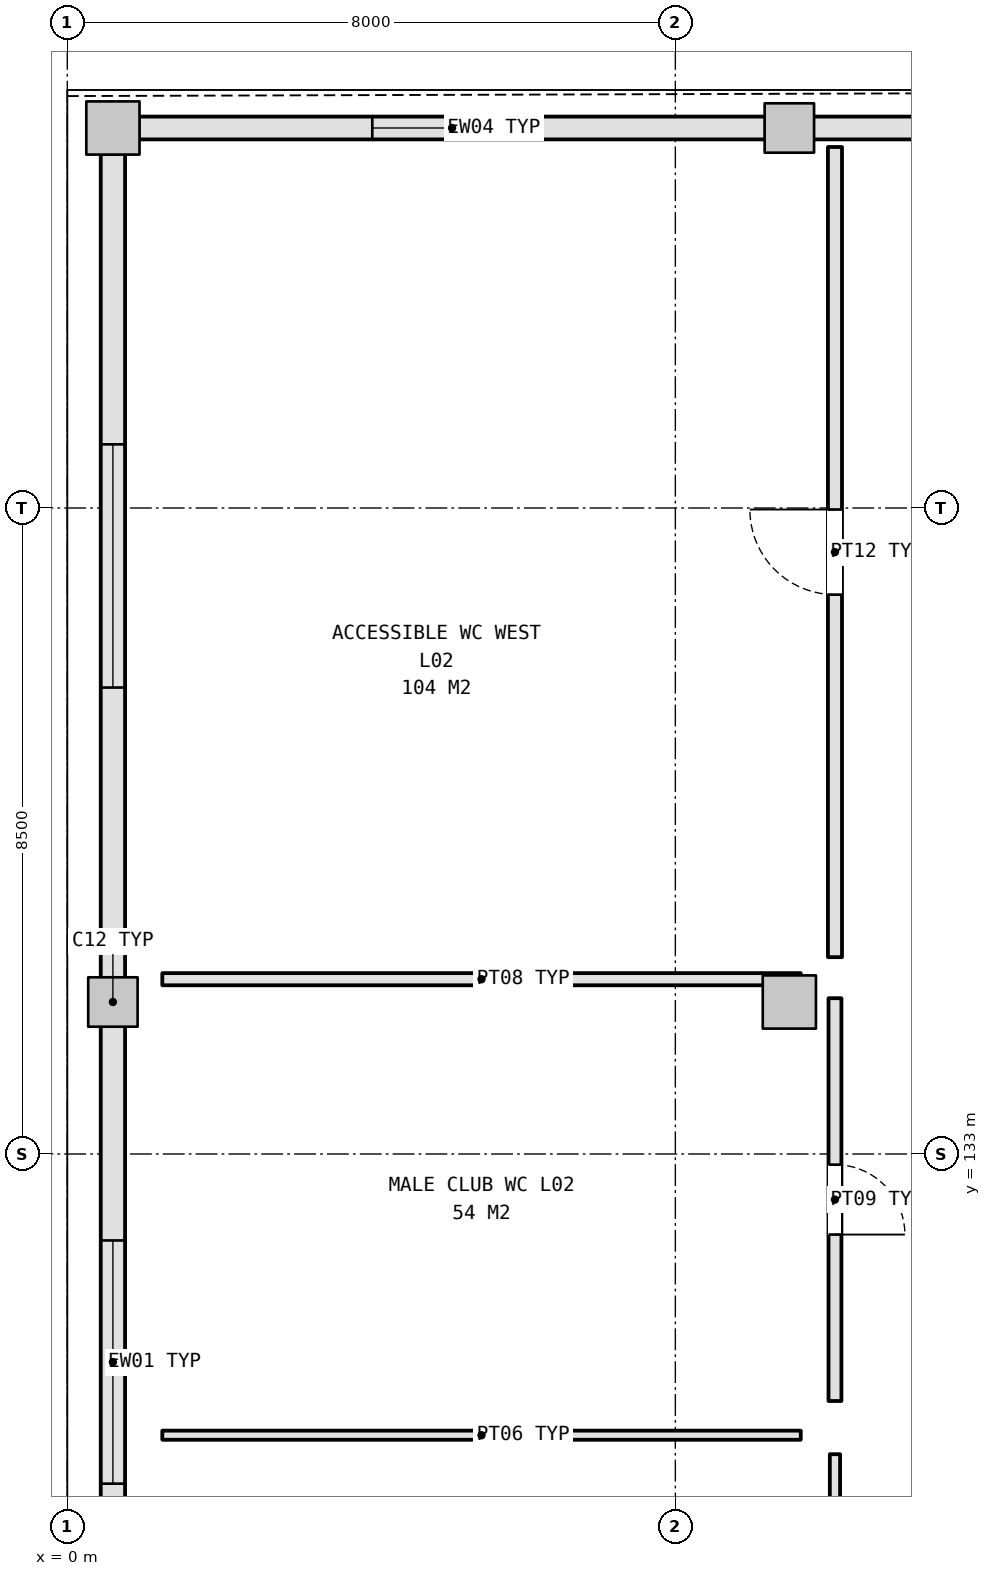
"""IFC4 building model, lengths in metres.
Left out: names, types, materials, properties, quantities, classifications, styles, units other than length and angle.
Written with IfcOpenShell. Run it as: python <this file> out.ifc"""

import sys

from ifc_helpers import new_model, si_unit, direction, frame, frame_2d, origin, origin_2d, place, context, subcontext, project, spatial, rectangle, extrude, element, fill, save


model = new_model("IFC4")
c1 = context("Model", 3, precision=1e-05, world=origin(), true_north=direction((0.0, 1.0)))
c2 = subcontext(c1, "Body", "Model", "MODEL_VIEW")
j1 = project(units=[si_unit("LENGTHUNIT", "METRE"), si_unit("PLANEANGLEUNIT", "RADIAN")], contexts=[c1])
p1 = place(None, origin())
s1 = spatial("IfcSite", under=j1, at=p1, CompositionType="ELEMENT")
p2 = place(p1, origin())
s2 = spatial("IfcBuilding", under=s1, at=p2, CompositionType="ELEMENT")
p3 = place(p2, frame((0.0, 0.0, 10.8)))
s3 = spatial("IfcBuildingStorey", under=s2, at=p3, CompositionType="ELEMENT", Elevation=10.8)
p4 = place(p3, frame((0.6, 135.0, 0.0), z_axis=(0.0, 0.0, 1.0), x_axis=(1.0, 0.0, 0.0)))
e1 = element("IfcColumn", 1, at=p4, inside=s3, PredefinedType="COLUMN", context=c2, shape_type="SweptSolid", body=[
    extrude(rectangle(XDim=0.65, YDim=0.65, at=origin_2d()), origin(), (0.0, 0.0, 1.0), 5.4),
])
for number, where, z_axis, x_axis in (
    (2, (0.6, 146.5, 0.0), (0.0, 0.0, 1.0), (1.0, 0.0, 0.0)),
    (3, (9.5, 135.0, 0.0), (0.0, 0.0, 1.0), (1.0, 0.0, 0.0)),
):
    element("IfcColumn", number, at=place(p3, frame(where, z_axis=z_axis, x_axis=x_axis)), inside=s3, PredefinedType="COLUMN", context=c2, shape_type="SweptSolid", body=[
        extrude(rectangle(XDim=0.7, YDim=0.7, at=origin_2d()), origin(), (0.0, 0.0, 1.0), 5.4),
    ])
p5 = place(p3, frame((9.5, 146.5, 0.0), z_axis=(0.0, 0.0, 1.0), x_axis=(1.0, 0.0, 0.0)))
e4 = element("IfcColumn", 4, at=p5, inside=s3, PredefinedType="COLUMN", context=c2, shape_type="SweptSolid", body=[
    extrude(rectangle(XDim=0.65, YDim=0.65, at=origin_2d()), origin(), (0.0, 0.0, 1.0), 5.4),
])
p6 = place(p3, frame((0.6, 125.838, 0.0), z_axis=(0.0, 0.0, 1.0), x_axis=(0.0, 1.0, 0.0)))
e5 = element("IfcWall", 5, at=p6, inside=s3, PredefinedType="SOLIDWALL", context=c2, shape_type="SweptSolid", body=[
    extrude(rectangle(XDim=8.849, YDim=0.32, at=frame_2d((4.425, 0.0))), origin(), (0.0, 0.0, 1.0), 4.485),
])
p7 = place(p6, frame((2.824, 0.0, 1.05)))
e6 = element("IfcOpeningElement", 6, at=p7, cuts=e5, PredefinedType="OPENING", context=c2, shape_type="SweptSolid", body=[
    extrude(rectangle(XDim=3.2, YDim=2.2, at=frame_2d((1.6, 1.1))), frame((0.0, 0.17, 0.0), z_axis=(0.0, -1.0, 0.0), x_axis=(1.0, 0.0, 0.0)), (0.0, 0.0, 1.0), 0.34),
])
p8 = place(p3, frame((0.6, 135.313, 0.0), z_axis=(0.0, 0.0, 1.0), x_axis=(0.0, 1.0, 0.0)))
e7 = element("IfcWall", 7, at=p8, inside=s3, PredefinedType="SOLIDWALL", context=c2, shape_type="SweptSolid", body=[
    extrude(rectangle(XDim=10.849, YDim=0.32, at=frame_2d((5.425, 0.0))), origin(), (0.0, 0.0, 1.0), 4.485),
])
p9 = place(p8, frame((3.824, 0.0, 1.05)))
e8 = element("IfcOpeningElement", 8, at=p9, cuts=e7, PredefinedType="OPENING", context=c2, shape_type="SweptSolid", body=[
    extrude(rectangle(XDim=3.2, YDim=2.2, at=frame_2d((1.6, 1.1))), frame((0.0, 0.17, 0.0), z_axis=(0.0, -1.0, 0.0), x_axis=(1.0, 0.0, 0.0)), (0.0, 0.0, 1.0), 0.34),
])
p10 = place(p3, frame((0.938, 146.5, 0.0), z_axis=(0.0, 0.0, 1.0), x_axis=(1.0, 0.0, 0.0)))
e9 = element("IfcWall", 9, at=p10, inside=s3, PredefinedType="SOLIDWALL", context=c2, shape_type="SweptSolid", body=[
    extrude(rectangle(XDim=8.249, YDim=0.3, at=frame_2d((4.125, 0.0))), origin(), (0.0, 0.0, 1.0), 4.485),
])
p11 = place(p10, frame((3.074, 0.0, 1.05)))
e10 = element("IfcOpeningElement", 10, at=p11, cuts=e9, PredefinedType="OPENING", context=c2, shape_type="SweptSolid", body=[
    extrude(rectangle(XDim=2.1, YDim=2.1, at=frame_2d((1.05, 1.05))), frame((0.0, 0.16, 0.0), z_axis=(0.0, -1.0, 0.0), x_axis=(1.0, 0.0, 0.0)), (0.0, 0.0, 1.0), 0.32),
])
p12 = place(p3, frame((9.813, 146.5, 0.0), z_axis=(0.0, 0.0, 1.0), x_axis=(1.0, 0.0, 0.0)))
e11 = element("IfcWall", 11, at=p12, inside=s3, PredefinedType="SOLIDWALL", context=c2, shape_type="SweptSolid", body=[
    extrude(rectangle(XDim=8.249, YDim=0.3, at=frame_2d((4.125, 0.0))), origin(), (0.0, 0.0, 1.0), 4.485),
])
p13 = place(p12, frame((3.074, 0.0, 1.05)))
e12 = element("IfcOpeningElement", 12, at=p13, cuts=e11, PredefinedType="OPENING", context=c2, shape_type="SweptSolid", body=[
    extrude(rectangle(XDim=2.1, YDim=2.1, at=frame_2d((1.05, 1.05))), frame((0.0, 0.16, 0.0), z_axis=(0.0, -1.0, 0.0), x_axis=(1.0, 0.0, 0.0)), (0.0, 0.0, 1.0), 0.32),
])
p14 = place(p3, frame((10.1, 129.05, 0.0), z_axis=(0.0, 0.0, 1.0), x_axis=(0.0, -1.0, 0.0)))
e13 = element("IfcWall", 13, at=p14, inside=s3, PredefinedType="PARTITIONING", context=c2, shape_type="SweptSolid", body=[
    extrude(rectangle(XDim=9.3, YDim=0.135, at=frame_2d((4.65, 0.0))), origin(), (0.0, 0.0, 1.0), 4.678),
])
p15 = place(p14, frame((4.2, 0.0, 0.0)))
e14 = element("IfcOpeningElement", 14, at=p15, cuts=e13, PredefinedType="OPENING", context=c2, shape_type="SweptSolid", body=[
    extrude(rectangle(XDim=1.7, YDim=2.25, at=frame_2d((0.85, 1.125))), frame((0.0, 0.077, 0.0), z_axis=(0.0, -1.0, 0.0), x_axis=(1.0, 0.0, 0.0)), (0.0, 0.0, 1.0), 0.155),
])
p16 = place(p3, frame((1.25, 129.3, 0.0), z_axis=(0.0, 0.0, 1.0), x_axis=(1.0, 0.0, 0.0)))
e15 = element("IfcWall", 15, at=p16, inside=s3, PredefinedType="PARTITIONING", context=c2, shape_type="SweptSolid", body=[
    extrude(rectangle(XDim=8.4, YDim=0.12, at=frame_2d((4.2, 0.0))), origin(), (0.0, 0.0, 1.0), 4.485),
])
p17 = place(p3, frame((10.1, 135.05, 0.0), z_axis=(0.0, 0.0, 1.0), x_axis=(0.0, -1.0, 0.0)))
e16 = element("IfcWall", 16, at=p17, inside=s3, PredefinedType="PARTITIONING", context=c2, shape_type="SweptSolid", body=[
    extrude(rectangle(XDim=5.3, YDim=0.17, at=frame_2d((2.65, 0.0))), origin(), (0.0, 0.0, 1.0), 4.678),
])
p18 = place(p17, frame((2.19, 0.0, 0.0)))
e17 = element("IfcOpeningElement", 17, at=p18, cuts=e16, PredefinedType="OPENING", context=c2, shape_type="SweptSolid", body=[
    extrude(rectangle(XDim=0.92, YDim=2.1, at=frame_2d((0.46, 1.05))), frame((0.0, 0.095, 0.0), z_axis=(0.0, -1.0, 0.0), x_axis=(1.0, 0.0, 0.0)), (0.0, 0.0, 1.0), 0.19),
])
p19 = place(p3, frame((1.25, 135.3, 0.0), z_axis=(0.0, 0.0, 1.0), x_axis=(1.0, 0.0, 0.0)))
e18 = element("IfcWall", 18, at=p19, inside=s3, PredefinedType="PARTITIONING", context=c2, shape_type="SweptSolid", body=[
    extrude(rectangle(XDim=8.4, YDim=0.16, at=frame_2d((4.2, 0.0))), origin(), (0.0, 0.0, 1.0), 4.485),
])
p20 = place(p3, frame((10.1, 146.25, 0.0), z_axis=(0.0, 0.0, 1.0), x_axis=(0.0, -1.0, 0.0)))
e19 = element("IfcWall", 19, at=p20, inside=s3, PredefinedType="PARTITIONING", context=c2, shape_type="SweptSolid", body=[
    extrude(rectangle(XDim=10.66, YDim=0.185, at=frame_2d((5.33, 0.0))), origin(), (0.0, 0.0, 1.0), 4.678),
])
p21 = place(p20, frame((4.77, 0.0, 0.0)))
e20 = element("IfcOpeningElement", 20, at=p21, cuts=e19, PredefinedType="OPENING", context=c2, shape_type="SweptSolid", body=[
    extrude(rectangle(XDim=1.12, YDim=2.2, at=frame_2d((0.56, 1.1))), frame((0.0, 0.103, 0.0), z_axis=(0.0, -1.0, 0.0), x_axis=(1.0, 0.0, 0.0)), (0.0, 0.0, 1.0), 0.205),
])
p22 = place(p7, origin())
e21 = element("IfcWindow", 21, at=p22, inside=s3, PartitioningType="SINGLE_PANEL", PredefinedType="WINDOW", context=c2, shape_type="SweptSolid", body=[
    extrude(rectangle(XDim=3.2, YDim=2.2, at=frame_2d((1.6, 1.1))), frame((0.0, 0.03, 0.0), z_axis=(0.0, -1.0, 0.0), x_axis=(1.0, 0.0, 0.0)), (0.0, 0.0, 1.0), 0.06),
])
fill(e6, e21)
p23 = place(p9, origin())
e22 = element("IfcWindow", 22, at=p23, inside=s3, PartitioningType="SINGLE_PANEL", PredefinedType="WINDOW", context=c2, shape_type="SweptSolid", body=[
    extrude(rectangle(XDim=3.2, YDim=2.2, at=frame_2d((1.6, 1.1))), frame((0.0, 0.03, 0.0), z_axis=(0.0, -1.0, 0.0), x_axis=(1.0, 0.0, 0.0)), (0.0, 0.0, 1.0), 0.06),
])
fill(e8, e22)
p24 = place(p11, origin())
e23 = element("IfcWindow", 23, at=p24, inside=s3, PartitioningType="SINGLE_PANEL", PredefinedType="WINDOW", context=c2, shape_type="SweptSolid", body=[
    extrude(rectangle(XDim=2.1, YDim=2.1, at=frame_2d((1.05, 1.05))), frame((0.0, 0.03, 0.0), z_axis=(0.0, -1.0, 0.0), x_axis=(1.0, 0.0, 0.0)), (0.0, 0.0, 1.0), 0.06),
])
fill(e10, e23)
p25 = place(p18, origin())
e24 = element("IfcDoor", 24, at=p25, inside=s3, OperationType="SINGLE_SWING_RIGHT", PredefinedType="DOOR", context=c2, shape_type="SweptSolid", body=[
    extrude(rectangle(XDim=0.92, YDim=2.1, at=frame_2d((0.46, 1.05))), frame((0.0, 0.025, 0.0), z_axis=(0.0, -1.0, 0.0), x_axis=(1.0, 0.0, 0.0)), (0.0, 0.0, 1.0), 0.05),
])
fill(e17, e24)
p26 = place(p21, frame((1.12, 0.0, 0.0), z_axis=(0.0, 0.0, 1.0), x_axis=(-1.0, 0.0, 0.0)))
e25 = element("IfcDoor", 25, at=p26, inside=s3, OperationType="SINGLE_SWING_LEFT", PredefinedType="DOOR", context=c2, shape_type="SweptSolid", body=[
    extrude(rectangle(XDim=1.12, YDim=2.2, at=frame_2d((0.56, 1.1))), frame((0.0, 0.025, 0.0), z_axis=(0.0, -1.0, 0.0), x_axis=(1.0, 0.0, 0.0)), (0.0, 0.0, 1.0), 0.05),
])
fill(e20, e25)
save(model, sys.argv[1])
